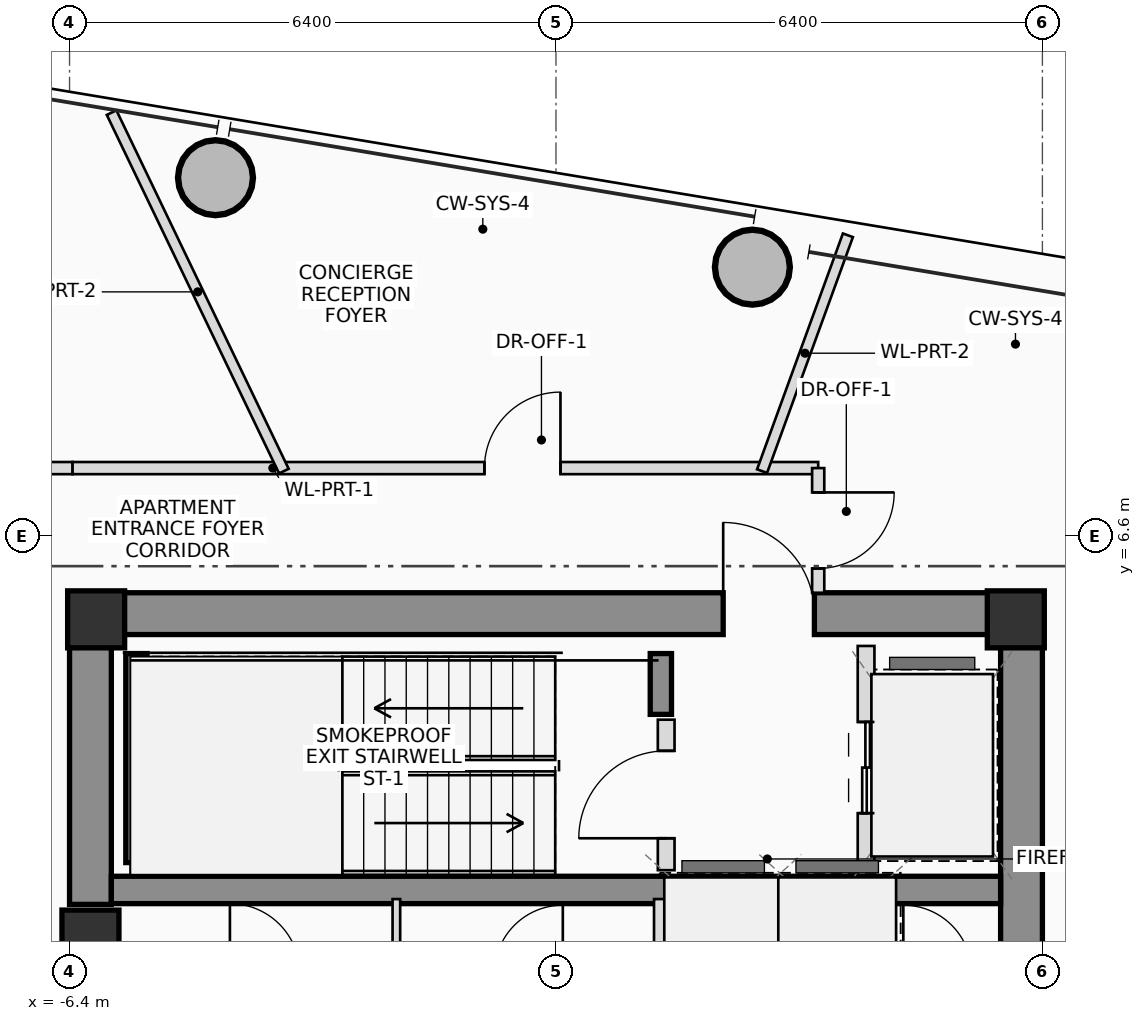
"""IFC4 building model, lengths in metres.
Left out: names, types, materials, properties, quantities, classifications, styles, units other than length and angle.
Written with IfcOpenShell. Run it as: python <this file> out.ifc"""

import sys

from ifc_helpers import new_model, si_unit, direction, frame, frame_2d, origin, origin_2d, place, context, subcontext, project, spatial, rectangle, hollow_circle, extrude, source, transform, mapped, element, fill, save


model = new_model("IFC4")
c1 = context("Model", 3, precision=1e-05, world=origin(), true_north=direction((0.0, 1.0)))
c2 = subcontext(c1, "Body", "Model", "MODEL_VIEW")
j1 = project(units=[si_unit("LENGTHUNIT", "METRE"), si_unit("PLANEANGLEUNIT", "RADIAN")], contexts=[c1])
p1 = place(None, origin())
s1 = spatial("IfcSite", under=j1, at=p1, CompositionType="ELEMENT")
p2 = place(p1, origin())
s2 = spatial("IfcBuilding", under=s1, at=p2, CompositionType="ELEMENT")
p3 = place(p2, frame((0.0, 0.0, 245.65)))
s3 = spatial("IfcBuildingStorey", under=s2, at=p3, CompositionType="ELEMENT", Elevation=245.65)
m1 = source(origin(), c2, "Body", "SweptSolid", [
    extrude(rectangle(XDim=0.75, YDim=0.75, at=origin_2d()), origin(), (0.0, 0.0, 1.0), 3.4),
])
for number, where, z_axis, x_axis in (
    (1, (6.05, 5.5, 0.0), (0.0, 0.0, 1.0), (1.0, 0.0, 0.0)),
    (2, (-6.05, 5.5, 0.0), (0.0, 0.0, 1.0), (1.0, 0.0, 0.0)),
):
    element("IfcColumn", number, at=place(p3, frame(where, z_axis=z_axis, x_axis=x_axis)), inside=s3, PredefinedType="COLUMN", context=c2, shape_type="MappedRepresentation", body=[
        mapped(m1, transform((0.0, 0.0, 0.0), scale=1.0)),
    ])
p4 = place(p3, frame((-6.4, 5.575, 0.0), z_axis=(0.0, 0.0, 1.0), x_axis=(1.0, 0.0, 0.0)))
e3 = element("IfcWall", 3, at=p4, inside=s3, PredefinedType="SHEAR", context=c2, shape_type="SweptSolid", body=[
    extrude(rectangle(XDim=12.8, YDim=0.55, at=frame_2d((6.4, 0.0))), origin(), (0.0, 0.0, 1.0), 3.4),
])
p5 = place(p4, frame((8.6, 0.0, 0.0)))
e4 = element("IfcOpeningElement", 4, at=p5, cuts=e3, PredefinedType="OPENING", context=c2, shape_type="SweptSolid", body=[
    extrude(rectangle(XDim=1.2, YDim=2.2, at=frame_2d((0.6, 1.1))), frame((0.0, 0.285, 0.0), z_axis=(0.0, -1.0, 0.0), x_axis=(1.0, 0.0, 0.0)), (0.0, 0.0, 1.0), 0.57),
])
p6 = place(p3, frame((6.125, -5.3, 0.0), z_axis=(0.0, 0.0, 1.0), x_axis=(0.0, 1.0, 0.0)))
e5 = element("IfcWall", 5, at=p6, inside=s3, PredefinedType="SHEAR", context=c2, shape_type="SweptSolid", body=[
    extrude(rectangle(XDim=10.6, YDim=0.55, at=frame_2d((5.3, 0.0))), origin(), (0.0, 0.0, 1.0), 3.4),
])
p7 = place(p3, frame((-6.125, 1.75, 0.0), z_axis=(0.0, 0.0, 1.0), x_axis=(0.0, 1.0, 0.0)))
e6 = element("IfcWall", 6, at=p7, inside=s3, PredefinedType="SHEAR", context=c2, shape_type="SweptSolid", body=[
    extrude(rectangle(XDim=3.55, YDim=0.55, at=frame_2d((1.775, 0.0))), origin(), (0.0, 0.0, 1.0), 3.4),
])
p8 = place(p3, frame((-5.85, 1.94, 0.0), z_axis=(0.0, 0.0, 1.0), x_axis=(1.0, 0.0, 0.0)))
e7 = element("IfcWall", 7, at=p8, inside=s3, PredefinedType="SHEAR", context=c2, shape_type="SweptSolid", body=[
    extrude(rectangle(XDim=11.7, YDim=0.36, at=frame_2d((5.85, 0.0))), origin(), (0.0, 0.0, 1.0), 3.4),
])
p9 = place(p3, frame((-5.52, 2.3, 0.0), z_axis=(0.0, 0.0, 1.0), x_axis=(0.0, 1.0, 0.0)))
e8 = element("IfcWall", 8, at=p9, inside=s3, PredefinedType="SHEAR", context=c2, shape_type="SweptSolid", body=[
    extrude(rectangle(XDim=2.75, YDim=0.28, at=frame_2d((1.375, 0.0))), origin(), (0.0, 0.0, 1.0), 3.4),
])
p10 = place(p3, frame((1.38, 4.25, 0.0), z_axis=(0.0, 0.0, 1.0), x_axis=(0.0, 1.0, 0.0)))
e9 = element("IfcWall", 9, at=p10, inside=s3, PredefinedType="SHEAR", context=c2, shape_type="SweptSolid", body=[
    extrude(rectangle(XDim=0.8, YDim=0.28, at=frame_2d((0.4, 0.0))), origin(), (0.0, 0.0, 1.0), 3.4),
])
p11 = place(p3, frame((-6.125, 1.3, 0.0), z_axis=(0.0, 0.0, 1.0), x_axis=(1.0, 0.0, 0.0)))
e10 = element("IfcColumn", 10, at=p11, inside=s3, PredefinedType="COLUMN", context=c2, shape_type="MappedRepresentation", body=[
    mapped(m1, transform((0.0, 0.0, 0.0), scale=1.0)),
])
m2 = source(origin(), c2, "Body", "SweptSolid", [
    extrude(hollow_circle(Radius=0.5, WallThickness=0.04, at=origin_2d()), origin(), (0.0, 0.0, 1.0), 3.4),
])
for number, where, z_axis, x_axis in (
    (11, (2.584, 10.134, 0.0), (0.0, 0.0, 1.0), (1.0, 0.0, 0.0)),
    (12, (-4.48, 11.311, 0.0), (0.0, 0.0, 1.0), (1.0, 0.0, 0.0)),
):
    element("IfcColumn", number, at=place(p3, frame(where, z_axis=z_axis, x_axis=x_axis)), inside=s3, PredefinedType="COLUMN", context=c2, shape_type="MappedRepresentation", body=[
        mapped(m2, transform((0.0, 0.0, 0.0), scale=1.0)),
    ])
p12 = place(p3, frame((1.45, 2.2, 0.0), z_axis=(0.0, 0.0, 1.0), x_axis=(0.0, 1.0, 0.0)))
e13 = element("IfcWall", 13, at=p12, inside=s3, PredefinedType="PLUMBINGWALL", context=c2, shape_type="SweptSolid", body=[
    extrude(rectangle(XDim=1.98, YDim=0.22, at=frame_2d((0.99, 0.0))), origin(), (0.0, 0.0, 1.0), 3.2),
])
p13 = place(p12, frame((0.42, 0.0, 0.0)))
e14 = element("IfcOpeningElement", 14, at=p13, cuts=e13, PredefinedType="OPENING", context=c2, shape_type="SweptSolid", body=[
    extrude(rectangle(XDim=1.15, YDim=2.15, at=frame_2d((0.575, 1.075))), frame((0.0, 0.12, 0.0), z_axis=(0.0, -1.0, 0.0), x_axis=(1.0, 0.0, 0.0)), (0.0, 0.0, 1.0), 0.24),
])
p14 = place(p3, frame((4.08, 2.2, 0.0), z_axis=(0.0, 0.0, 1.0), x_axis=(0.0, 1.0, 0.0)))
e15 = element("IfcWall", 15, at=p14, inside=s3, PredefinedType="PLUMBINGWALL", context=c2, shape_type="SweptSolid", body=[
    extrude(rectangle(XDim=2.95, YDim=0.22, at=frame_2d((1.475, 0.0))), origin(), (0.0, 0.0, 1.0), 3.2),
])
p15 = place(p14, frame((0.75, 0.0, 0.0)))
e16 = element("IfcOpeningElement", 16, at=p15, cuts=e15, PredefinedType="OPENING", context=c2, shape_type="SweptSolid", body=[
    extrude(rectangle(XDim=1.2, YDim=2.25, at=frame_2d((0.6, 1.125))), frame((0.0, 0.12, 0.0), z_axis=(0.0, -1.0, 0.0), x_axis=(1.0, 0.0, 0.0)), (0.0, 0.0, 1.0), 0.24),
])
p16 = place(p3, frame((-2.1, 0.84, 0.0), z_axis=(0.0, 0.0, 1.0), x_axis=(0.0, 1.0, 0.0)))
e17 = element("IfcWall", 17, at=p16, inside=s3, PredefinedType="PARTITIONING", context=c2, shape_type="SweptSolid", body=[
    extrude(rectangle(XDim=0.98, YDim=0.1, at=frame_2d((0.49, 0.0))), origin(), (0.0, 0.0, 1.0), 3.2),
])
for number, where, z_axis, x_axis in (
    (18, (1.38, 0.84, 0.0), (0.0, 0.0, 1.0), (0.0, 1.0, 0.0)),
    (19, (3.02, 0.84, 0.0), (0.0, 0.0, 1.0), (0.0, 1.0, 0.0)),
    (20, (4.38, 0.84, 0.0), (0.0, 0.0, 1.0), (0.0, 1.0, 0.0)),
):
    element("IfcWall", number, at=place(p3, frame(where, z_axis=z_axis, x_axis=x_axis)), inside=s3, PredefinedType="PLUMBINGWALL", context=c2, shape_type="SweptSolid", body=[
        extrude(rectangle(XDim=0.98, YDim=0.18, at=frame_2d((0.49, 0.0))), origin(), (0.0, 0.0, 1.0), 3.2),
    ])
p17 = place(p3, frame((-8.04, 7.49, 0.0), z_axis=(0.0, 0.0, 1.0), x_axis=(1.0, 0.0, 0.0)))
e21 = element("IfcWall", 21, at=p17, inside=s3, PredefinedType="PARTITIONING", context=c2, shape_type="SweptSolid", body=[
    extrude(rectangle(XDim=1.68, YDim=0.16, at=frame_2d((0.84, 0.0))), origin(), (0.0, 0.0, 1.0), 2.605),
])
p18 = place(p3, frame((-6.36, 7.49, 0.0), z_axis=(0.0, 0.0, 1.0), x_axis=(1.0, 0.0, 0.0)))
e22 = element("IfcWall", 22, at=p18, inside=s3, PredefinedType="PARTITIONING", context=c2, shape_type="SweptSolid", body=[
    extrude(rectangle(XDim=9.81, YDim=0.16, at=frame_2d((4.905, 0.0))), origin(), (0.0, 0.0, 1.0), 2.605),
])
p19 = place(p18, frame((5.419, 0.0, 0.0)))
e23 = element("IfcOpeningElement", 23, at=p19, cuts=e22, PredefinedType="OPENING", context=c2, shape_type="SweptSolid", body=[
    extrude(rectangle(XDim=1.0, YDim=2.25, at=frame_2d((0.5, 1.125))), frame((0.0, 0.09, 0.0), z_axis=(0.0, -1.0, 0.0), x_axis=(1.0, 0.0, 0.0)), (0.0, 0.0, 1.0), 0.18),
])
p20 = place(p3, frame((3.45, 7.49, 0.0), z_axis=(0.0, 0.0, 1.0), x_axis=(0.0, -1.0, 0.0)))
e24 = element("IfcWall", 24, at=p20, inside=s3, PredefinedType="PARTITIONING", context=c2, shape_type="SweptSolid", body=[
    extrude(rectangle(XDim=1.64, YDim=0.16, at=frame_2d((0.82, 0.0))), origin(), (0.0, 0.0, 1.0), 3.2),
])
p21 = place(p20, frame((0.32, 0.0, 0.0)))
e25 = element("IfcOpeningElement", 25, at=p21, cuts=e24, PredefinedType="OPENING", context=c2, shape_type="SweptSolid", body=[
    extrude(rectangle(XDim=1.0, YDim=2.25, at=frame_2d((0.5, 1.125))), frame((0.0, 0.09, 0.0), z_axis=(0.0, -1.0, 0.0), x_axis=(1.0, 0.0, 0.0)), (0.0, 0.0, 1.0), 0.18),
])
p22 = place(p3, frame((2.712, 7.45, 0.0), z_axis=(0.0, 0.0, 1.0), x_axis=(0.341974588874, 0.9397092, 0.0)))
e26 = element("IfcWall", 26, at=p22, inside=s3, PredefinedType="PARTITIONING", context=c2, shape_type="SweptSolid", body=[
    extrude(rectangle(XDim=3.302, YDim=0.14, at=frame_2d((1.651, 0.0))), origin(), (0.0, 0.0, 1.0), 2.605),
])
p23 = place(p3, frame((-3.58, 7.45, 0.0), z_axis=(0.0, 0.0, 1.0), x_axis=(-0.433107149182, 0.901342441765, 0.0)))
e27 = element("IfcWall", 27, at=p23, inside=s3, PredefinedType="PARTITIONING", context=c2, shape_type="SweptSolid", body=[
    extrude(rectangle(XDim=5.233, YDim=0.14, at=frame_2d((2.617, 0.0))), origin(), (0.0, 0.0, 1.0), 2.605),
])
p24 = place(p5, origin())
e28 = element("IfcDoor", 28, at=p24, inside=s3, OperationType="SINGLE_SWING_LEFT", PredefinedType="DOOR", context=c2, shape_type="SweptSolid", body=[
    extrude(rectangle(XDim=1.2, YDim=2.2, at=frame_2d((0.6, 1.1))), frame((0.0, 0.025, 0.0), z_axis=(0.0, -1.0, 0.0), x_axis=(1.0, 0.0, 0.0)), (0.0, 0.0, 1.0), 0.05),
])
fill(e4, e28)
p25 = place(p13, origin())
e29 = element("IfcDoor", 29, at=p25, inside=s3, OperationType="SINGLE_SWING_LEFT", PredefinedType="DOOR", context=c2, shape_type="SweptSolid", body=[
    extrude(rectangle(XDim=1.15, YDim=2.15, at=frame_2d((0.575, 1.075))), frame((0.0, 0.025, 0.0), z_axis=(0.0, -1.0, 0.0), x_axis=(1.0, 0.0, 0.0)), (0.0, 0.0, 1.0), 0.05),
])
fill(e14, e29)
p26 = place(p15, origin())
e30 = element("IfcDoor", 30, at=p26, inside=s3, OperationType="DOUBLE_DOOR_SLIDING", PredefinedType="DOOR", context=c2, shape_type="SweptSolid", body=[
    extrude(rectangle(XDim=1.2, YDim=2.25, at=frame_2d((0.6, 1.125))), frame((0.0, 0.025, 0.0), z_axis=(0.0, -1.0, 0.0), x_axis=(1.0, 0.0, 0.0)), (0.0, 0.0, 1.0), 0.05),
])
fill(e16, e30)
p27 = place(p19, origin())
e31 = element("IfcDoor", 31, at=p27, inside=s3, OperationType="SINGLE_SWING_RIGHT", PredefinedType="DOOR", context=c2, shape_type="SweptSolid", body=[
    extrude(rectangle(XDim=1.0, YDim=2.25, at=frame_2d((0.5, 1.125))), frame((0.0, 0.025, 0.0), z_axis=(0.0, -1.0, 0.0), x_axis=(1.0, 0.0, 0.0)), (0.0, 0.0, 1.0), 0.05),
])
fill(e23, e31)
p28 = place(p21, origin())
e32 = element("IfcDoor", 32, at=p28, inside=s3, OperationType="SINGLE_SWING_LEFT", PredefinedType="DOOR", context=c2, shape_type="SweptSolid", body=[
    extrude(rectangle(XDim=1.0, YDim=2.25, at=frame_2d((0.5, 1.125))), frame((0.0, 0.025, 0.0), z_axis=(0.0, -1.0, 0.0), x_axis=(1.0, 0.0, 0.0)), (0.0, 0.0, 1.0), 0.05),
])
fill(e25, e32)
save(model, sys.argv[1])
